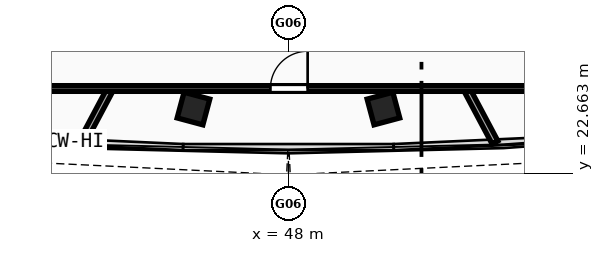
"""IFC4 building model, lengths in metres.
Left out: names, types, materials, properties, quantities, classifications, styles, units other than length and angle.
Written with IfcOpenShell. Run it as: python <this file> out.ifc"""

import sys

from ifc_helpers import new_model, si_unit, direction, frame, frame_2d, origin, origin_with_axes, origin_2d, place, context, subcontext, project, spatial, rectangle, hollow_rectangle, extrude, source, transform, mapped, element, fill, save


model = new_model("IFC4")
c1 = context("Model", 3, precision=1e-05, world=origin(), true_north=direction((0.0, 1.0)))
c2 = subcontext(c1, "Body", "Model", "MODEL_VIEW")
j1 = project(units=[si_unit("LENGTHUNIT", "METRE"), si_unit("PLANEANGLEUNIT", "RADIAN")], contexts=[c1])
p1 = place(None, origin())
s1 = spatial("IfcSite", under=j1, at=p1, CompositionType="ELEMENT")
p2 = place(p1, origin())
s2 = spatial("IfcBuilding", under=s1, at=p2, CompositionType="ELEMENT")
p3 = place(p2, frame((0.0, 0.0, 366.76)))
s3 = spatial("IfcBuildingStorey", under=s2, at=p3, CompositionType="ELEMENT", Elevation=366.76)
m1 = source(origin(), c2, "Body", "SweptSolid", [
    extrude(hollow_rectangle(XDim=0.7, YDim=0.7, WallThickness=0.026, at=origin_2d()), origin(), (0.0, 0.0, 1.0), 5.0),
])
for number, where, z_axis, x_axis in (
    (1, (45.501, 24.373, -0.28), (0.0, 0.0, 1.0), (0.966, -0.259, 0.0)),
    (2, (50.499, 24.373, -0.28), (0.0, 0.0, 1.0), (0.966, 0.259, 0.0)),
):
    element("IfcColumn", number, at=place(p3, frame(where, z_axis=z_axis, x_axis=x_axis)), inside=s3, PredefinedType="COLUMN", context=c2, shape_type="MappedRepresentation", body=[
        mapped(m1, transform((0.0, 0.0, 0.0), scale=1.0)),
    ])
for number, where, z_axis, x_axis in (
    (3, (43.321, 24.9, 0.0), (0.0, 0.0, 1.0), (-0.469, -0.883, 0.0)),
    (4, (52.679, 24.9, 0.0), (0.0, 0.0, 1.0), (0.469, -0.883, 0.0)),
):
    element("IfcWall", number, at=place(p3, frame(where, z_axis=z_axis, x_axis=x_axis)), inside=s3, PredefinedType="PARTITIONING", context=c2, shape_type="SweptSolid", body=[
        extrude(rectangle(XDim=1.608, YDim=0.17, at=frame_2d((0.804, 0.0))), origin(), (0.0, 0.0, 1.0), 4.12),
    ])
p4 = place(p3, frame((33.1, 24.9, 0.0), z_axis=(0.0, 0.0, 1.0), x_axis=(1.0, 0.0, 0.0)))
e5 = element("IfcWall", 5, at=p4, inside=s3, PredefinedType="PARTITIONING", context=c2, shape_type="SweptSolid", body=[
    extrude(rectangle(XDim=29.8, YDim=0.15, at=frame_2d((14.9, 0.0))), origin(), (0.0, 0.0, 1.0), 4.12),
])
p5 = place(p4, frame((14.425, 0.0, 0.0)))
e6 = element("IfcOpeningElement", 6, at=p5, cuts=e5, PredefinedType="OPENING", context=c2, shape_type="SweptSolid", body=[
    extrude(rectangle(XDim=0.98, YDim=2.12, at=frame_2d((0.49, 1.06))), frame((0.0, 0.085, 0.0), z_axis=(0.0, -1.0, 0.0), x_axis=(1.0, 0.0, 0.0)), (0.0, 0.0, 1.0), 0.17),
])
p6 = place(p4, frame((26.575, 0.0, 0.0)))
e7 = element("IfcOpeningElement", 7, at=p6, cuts=e5, PredefinedType="OPENING", context=c2, shape_type="SweptSolid", body=[
    extrude(rectangle(XDim=0.98, YDim=2.12, at=frame_2d((0.49, 1.06))), frame((0.0, 0.085, 0.0), z_axis=(0.0, -1.0, 0.0), x_axis=(1.0, 0.0, 0.0)), (0.0, 0.0, 1.0), 0.17),
])
m2 = source(origin(), c2, "Body", "SweptSolid", [
    extrude(rectangle(XDim=0.98, YDim=2.12, at=frame_2d((0.49, 1.06))), frame((0.0, 0.025, 0.0), z_axis=(0.0, -1.0, 0.0), x_axis=(1.0, 0.0, 0.0)), (0.0, 0.0, 1.0), 0.05),
])
p7 = place(p5, origin_with_axes())
e8 = element("IfcDoor", 8, at=p7, inside=s3, OperationType="SINGLE_SWING_RIGHT", PredefinedType="DOOR", context=c2, shape_type="MappedRepresentation", body=[
    mapped(m2, transform((0.0, 0.0, 0.0), scale=1.0)),
])
fill(e6, e8)
save(model, sys.argv[1])
